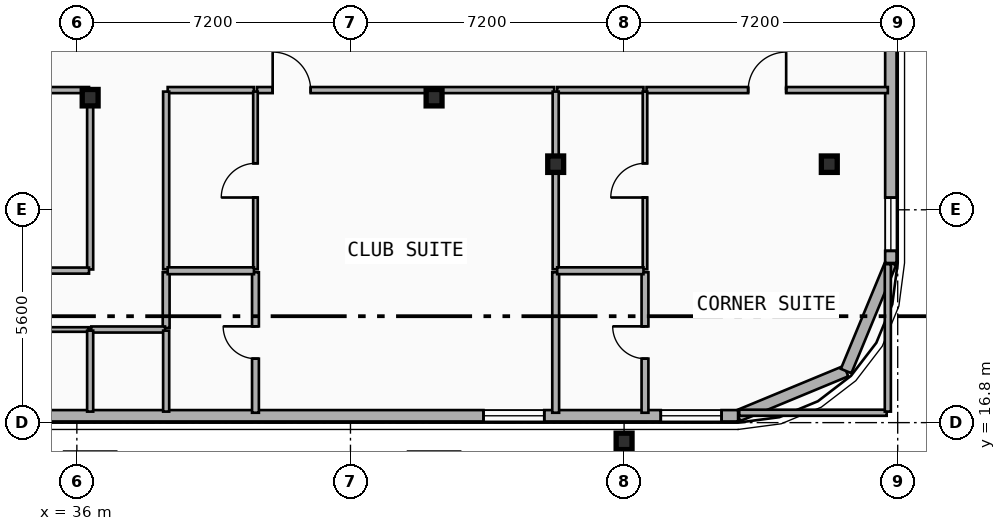
"""IFC4 building model, lengths in metres.
Left out: names, types, materials, properties, quantities, classifications, styles, units other than length and angle.
Written with IfcOpenShell. Run it as: python <this file> out.ifc"""

import sys

from ifc_helpers import new_model, si_unit, direction, frame, frame_2d, origin, origin_2d, place, context, subcontext, project, spatial, rectangle, i_section, extrude, element, fill, save


model = new_model("IFC4")
c1 = context("Model", 3, precision=1e-05, world=origin(), true_north=direction((0.0, 1.0)))
c2 = subcontext(c1, "Body", "Model", "MODEL_VIEW")
j1 = project(units=[si_unit("LENGTHUNIT", "METRE"), si_unit("PLANEANGLEUNIT", "RADIAN")], contexts=[c1])
p1 = place(None, origin())
s1 = spatial("IfcSite", under=j1, at=p1, CompositionType="ELEMENT")
p2 = place(p1, origin())
s2 = spatial("IfcBuilding", under=s1, at=p2, CompositionType="ELEMENT")
p3 = place(p2, frame((0.0, 0.0, 118.8)))
s3 = spatial("IfcBuildingStorey", under=s2, at=p3, CompositionType="ELEMENT", Elevation=118.8)
for number, where, z_axis, x_axis in (
    (1, (36.35, 25.35, 0.0), (0.0, 0.0, 1.0), (1.0, 0.0, 0.0)),
    (2, (45.4, 25.35, 0.0), (0.0, 0.0, 1.0), (1.0, 0.0, 0.0)),
):
    element("IfcColumn", number, at=place(p3, frame(where, z_axis=z_axis, x_axis=x_axis)), inside=s3, PredefinedType="COLUMN", context=c2, shape_type="SweptSolid", body=[
        extrude(i_section(OverallWidth=0.418, OverallDepth=0.432, WebThickness=0.035, FlangeThickness=0.056, FilletRadius=0.015, at=origin_2d()), origin(), (0.0, 0.0, 1.0), 3.5),
    ])
for number, where, z_axis, x_axis in (
    (3, (36.35, 15.462, 0.0), (0.0, -0.09, 0.996), (1.0, 0.0, 0.0)),
    (4, (45.4, 15.462, 0.0), (0.0, -0.09, 0.996), (1.0, 0.0, 0.0)),
):
    element("IfcColumn", number, at=place(p3, frame(where, z_axis=z_axis, x_axis=x_axis)), inside=s3, PredefinedType="COLUMN", context=c2, shape_type="SweptSolid", body=[
        extrude(rectangle(XDim=1.3, YDim=1.3, at=origin_2d()), origin(), (0.0, 0.0, 1.0), 3.514),
    ])
p4 = place(p3, frame((48.6, 23.6, 0.0), z_axis=(0.0, 0.0, 1.0), x_axis=(1.0, 0.0, 0.0)))
e5 = element("IfcColumn", 5, at=p4, inside=s3, PredefinedType="COLUMN", context=c2, shape_type="SweptSolid", body=[
    extrude(i_section(OverallWidth=0.418, OverallDepth=0.432, WebThickness=0.035, FlangeThickness=0.056, FilletRadius=0.015, at=origin_2d()), origin(), (0.0, 0.0, 1.0), 3.5),
])
p5 = place(p3, frame((50.4, 16.403, 0.0), z_axis=(0.0, -0.079891690793, 0.996803550226), x_axis=(1.0, 0.0, 0.0)))
e6 = element("IfcColumn", 6, at=p5, inside=s3, PredefinedType="COLUMN", context=c2, shape_type="SweptSolid", body=[
    extrude(i_section(OverallWidth=0.418, OverallDepth=0.432, WebThickness=0.035, FlangeThickness=0.056, FilletRadius=0.015, at=origin_2d()), origin(), (0.0, 0.0, 1.0), 3.511),
])
p6 = place(p3, frame((55.8, 23.6, 0.0), z_axis=(0.0, 0.0, 1.0), x_axis=(1.0, 0.0, 0.0)))
e7 = element("IfcColumn", 7, at=p6, inside=s3, PredefinedType="COLUMN", context=c2, shape_type="SweptSolid", body=[
    extrude(i_section(OverallWidth=0.418, OverallDepth=0.432, WebThickness=0.035, FlangeThickness=0.056, FilletRadius=0.015, at=origin_2d()), origin(), (0.0, 0.0, 1.0), 3.5),
])
p7 = place(p3, frame((56.243, 18.157, 0.0), z_axis=(0.0, 0.0, 1.0), x_axis=(-0.923882414032, -0.382676475685, 0.0)))
e8 = element("IfcWall", 8, at=p7, inside=s3, PredefinedType="SOLIDWALL", context=c2, shape_type="SweptSolid", body=[
    extrude(rectangle(XDim=3.077, YDim=0.3, at=frame_2d((1.539, 0.0))), origin(), (0.0, 0.0, 1.0), 3.24),
])
p8 = place(p3, frame((57.42, 21.0, 0.0), z_axis=(0.0, 0.0, 1.0), x_axis=(-0.382636798336, -0.92389884758, 0.0)))
e9 = element("IfcWall", 9, at=p8, inside=s3, PredefinedType="SOLIDWALL", context=c2, shape_type="SweptSolid", body=[
    extrude(rectangle(XDim=3.077, YDim=0.3, at=frame_2d((1.538, 0.0))), origin(), (0.0, 0.0, 1.0), 3.24),
])
p9 = place(p3, frame((57.42, 39.0, 0.0), z_axis=(0.0, 0.0, 1.0), x_axis=(0.0, -1.0, 0.0)))
e10 = element("IfcWall", 10, at=p9, inside=s3, PredefinedType="SOLIDWALL", context=c2, shape_type="SweptSolid", body=[
    extrude(rectangle(XDim=18.0, YDim=0.3, at=frame_2d((9.0, 0.0))), origin(), (0.0, 0.0, 1.0), 3.24),
])
p10 = place(p9, frame((8.882, 0.0, 0.48)))
e11 = element("IfcOpeningElement", 11, at=p10, cuts=e10, PredefinedType="OPENING", context=c2, shape_type="SweptSolid", body=[
    extrude(rectangle(XDim=1.4, YDim=1.8, at=frame_2d((0.7, 0.9))), frame((0.0, 0.16, 0.0), z_axis=(0.0, -1.0, 0.0), x_axis=(1.0, 0.0, 0.0)), (0.0, 0.0, 1.0), 0.32),
])
p11 = place(p9, frame((3.621, 0.0, 0.48)))
e12 = element("IfcOpeningElement", 12, at=p11, cuts=e10, PredefinedType="OPENING", context=c2, shape_type="SweptSolid", body=[
    extrude(rectangle(XDim=1.4, YDim=1.8, at=frame_2d((0.7, 0.9))), frame((0.0, 0.16, 0.0), z_axis=(0.0, -1.0, 0.0), x_axis=(1.0, 0.0, 0.0)), (0.0, 0.0, 1.0), 0.32),
])
p12 = place(p9, frame((16.28, 0.0, 0.65)))
e13 = element("IfcOpeningElement", 13, at=p12, cuts=e10, PredefinedType="OPENING", context=c2, shape_type="SweptSolid", body=[
    extrude(rectangle(XDim=1.4, YDim=1.8, at=frame_2d((0.7, 0.9))), frame((0.0, 0.16, 0.0), z_axis=(0.0, -1.0, 0.0), x_axis=(1.0, 0.0, 0.0)), (0.0, 0.0, 1.0), 0.32),
])
p13 = place(p3, frame((53.4, 16.98, 0.0), z_axis=(0.0, 0.0, 1.0), x_axis=(-1.0, 0.0, 0.0)))
e14 = element("IfcWall", 14, at=p13, inside=s3, PredefinedType="SOLIDWALL", context=c2, shape_type="SweptSolid", body=[
    extrude(rectangle(XDim=49.2, YDim=0.3, at=frame_2d((24.6, 0.0))), origin(), (0.0, 0.0, 1.0), 3.24),
])
p14 = place(p13, frame((41.962, 0.0, 0.65)))
e15 = element("IfcOpeningElement", 15, at=p14, cuts=e14, PredefinedType="OPENING", context=c2, shape_type="SweptSolid", body=[
    extrude(rectangle(XDim=1.6, YDim=1.95, at=frame_2d((0.8, 0.975))), frame((0.0, 0.16, 0.0), z_axis=(0.0, -1.0, 0.0), x_axis=(1.0, 0.0, 0.0)), (0.0, 0.0, 1.0), 0.32),
])
p15 = place(p13, frame((28.7, 0.0, 0.65)))
e16 = element("IfcOpeningElement", 16, at=p15, cuts=e14, PredefinedType="OPENING", context=c2, shape_type="SweptSolid", body=[
    extrude(rectangle(XDim=1.6, YDim=1.95, at=frame_2d((0.8, 0.975))), frame((0.0, 0.16, 0.0), z_axis=(0.0, -1.0, 0.0), x_axis=(1.0, 0.0, 0.0)), (0.0, 0.0, 1.0), 0.32),
])
p16 = place(p13, frame((5.1, 0.0, 0.65)))
e17 = element("IfcOpeningElement", 17, at=p16, cuts=e14, PredefinedType="OPENING", context=c2, shape_type="SweptSolid", body=[
    extrude(rectangle(XDim=1.6, YDim=1.95, at=frame_2d((0.8, 0.975))), frame((0.0, 0.16, 0.0), z_axis=(0.0, -1.0, 0.0), x_axis=(1.0, 0.0, 0.0)), (0.0, 0.0, 1.0), 0.32),
])
p17 = place(p13, frame((0.435, 0.0, 0.48)))
e18 = element("IfcOpeningElement", 18, at=p17, cuts=e14, PredefinedType="OPENING", context=c2, shape_type="SweptSolid", body=[
    extrude(rectangle(XDim=1.6, YDim=1.95, at=frame_2d((0.8, 0.975))), frame((0.0, 0.16, 0.0), z_axis=(0.0, -1.0, 0.0), x_axis=(1.0, 0.0, 0.0)), (0.0, 0.0, 1.0), 0.32),
])
p18 = place(p3, frame((40.74, 25.55, 0.0), z_axis=(0.0, 0.0, 1.0), x_axis=(1.0, 0.0, 0.0)))
e19 = element("IfcWall", 19, at=p18, inside=s3, PredefinedType="PARTITIONING", context=c2, shape_type="SweptSolid", body=[
    extrude(rectangle(XDim=7.82, YDim=0.16, at=frame_2d((3.91, 0.0))), origin(), (0.0, 0.0, 1.0), 2.406),
])
p19 = place(p18, frame((0.413, 0.0, 0.0)))
e20 = element("IfcOpeningElement", 20, at=p19, cuts=e19, PredefinedType="OPENING", context=c2, shape_type="SweptSolid", body=[
    extrude(rectangle(XDim=1.0, YDim=2.15, at=frame_2d((0.5, 1.075))), frame((0.0, 0.09, 0.0), z_axis=(0.0, -1.0, 0.0), x_axis=(1.0, 0.0, 0.0)), (0.0, 0.0, 1.0), 0.18),
])
p20 = place(p3, frame((38.39, 25.55, 0.0), z_axis=(0.0, 0.0, 1.0), x_axis=(1.0, 0.0, 0.0)))
e21 = element("IfcWall", 21, at=p20, inside=s3, PredefinedType="PARTITIONING", context=c2, shape_type="SweptSolid", body=[
    extrude(rectangle(XDim=2.27, YDim=0.16, at=frame_2d((1.135, 0.0))), origin(), (0.0, 0.0, 1.0), 3.24),
])
p21 = place(p3, frame((50.99, 25.55, 0.0), z_axis=(0.0, 0.0, 1.0), x_axis=(1.0, 0.0, 0.0)))
e22 = element("IfcWall", 22, at=p21, inside=s3, PredefinedType="PARTITIONING", context=c2, shape_type="SweptSolid", body=[
    extrude(rectangle(XDim=6.35, YDim=0.16, at=frame_2d((3.175, 0.0))), origin(), (0.0, 0.0, 1.0), 2.57),
])
p22 = place(p21, frame((2.675, 0.0, 0.0)))
e23 = element("IfcOpeningElement", 23, at=p22, cuts=e22, PredefinedType="OPENING", context=c2, shape_type="SweptSolid", body=[
    extrude(rectangle(XDim=1.0, YDim=2.15, at=frame_2d((0.5, 1.075))), frame((0.0, 0.09, 0.0), z_axis=(0.0, -1.0, 0.0), x_axis=(1.0, 0.0, 0.0)), (0.0, 0.0, 1.0), 0.18),
])
p23 = place(p3, frame((48.64, 25.55, 0.0), z_axis=(0.0, 0.0, 1.0), x_axis=(1.0, 0.0, 0.0)))
e24 = element("IfcWall", 24, at=p23, inside=s3, PredefinedType="PARTITIONING", context=c2, shape_type="SweptSolid", body=[
    extrude(rectangle(XDim=2.27, YDim=0.16, at=frame_2d((1.135, 0.0))), origin(), (0.0, 0.0, 1.0), 2.57),
])
p24 = place(p3, frame((38.35, 19.29, 0.0), z_axis=(0.0, 0.0, 1.0), x_axis=(0.0, 1.0, 0.0)))
e25 = element("IfcWall", 25, at=p24, inside=s3, PredefinedType="PLUMBINGWALL", context=c2, shape_type="SweptSolid", body=[
    extrude(rectangle(XDim=1.466, YDim=0.18, at=frame_2d((0.733, 0.0))), origin(), (0.0, 0.0, 1.0), 2.67),
])
p25 = place(p3, frame((38.35, 20.836, 0.0), z_axis=(0.0, 0.0, 1.0), x_axis=(0.0, 1.0, 0.0)))
e26 = element("IfcWall", 26, at=p25, inside=s3, PredefinedType="PARTITIONING", context=c2, shape_type="SweptSolid", body=[
    extrude(rectangle(XDim=4.674, YDim=0.16, at=frame_2d((2.337, 0.0))), origin(), (0.0, 0.0, 1.0), 2.82),
])
p26 = place(p3, frame((22.84, 19.25, 0.0), z_axis=(0.0, 0.0, 1.0), x_axis=(1.0, 0.0, 0.0)))
e27 = element("IfcWall", 27, at=p26, inside=s3, PredefinedType="PARTITIONING", context=c2, shape_type="SweptSolid", body=[
    extrude(rectangle(XDim=13.47, YDim=0.12, at=frame_2d((6.735, 0.0))), origin(), (0.0, 0.0, 1.0), 2.406),
])
p27 = place(p26, frame((6.285, 0.0, 0.0)))
e28 = element("IfcOpeningElement", 28, at=p27, cuts=e27, PredefinedType="OPENING", context=c2, shape_type="SweptSolid", body=[
    extrude(rectangle(XDim=0.9, YDim=2.1, at=frame_2d((0.45, 1.05))), frame((0.0, 0.07, 0.0), z_axis=(0.0, -1.0, 0.0), x_axis=(1.0, 0.0, 0.0)), (0.0, 0.0, 1.0), 0.14),
])
p28 = place(p3, frame((40.7, 17.06, 0.0), z_axis=(0.0, 0.0, 1.0), x_axis=(0.0, 1.0, 0.0)))
e29 = element("IfcWall", 29, at=p28, inside=s3, PredefinedType="PLUMBINGWALL", context=c2, shape_type="SweptSolid", body=[
    extrude(rectangle(XDim=3.696, YDim=0.18, at=frame_2d((1.848, 0.0))), origin(), (0.0, 0.0, 1.0), 2.67),
])
p29 = place(p28, frame((1.423, 0.0, 0.0)))
e30 = element("IfcOpeningElement", 30, at=p29, cuts=e29, PredefinedType="OPENING", context=c2, shape_type="SweptSolid", body=[
    extrude(rectangle(XDim=0.85, YDim=2.1, at=frame_2d((0.425, 1.05))), frame((0.0, 0.1, 0.0), z_axis=(0.0, -1.0, 0.0), x_axis=(1.0, 0.0, 0.0)), (0.0, 0.0, 1.0), 0.2),
])
p30 = place(p3, frame((40.7, 20.836, 0.0), z_axis=(0.0, 0.0, 1.0), x_axis=(0.0, 1.0, 0.0)))
e31 = element("IfcWall", 31, at=p30, inside=s3, PredefinedType="PARTITIONING", context=c2, shape_type="SweptSolid", body=[
    extrude(rectangle(XDim=4.674, YDim=0.12, at=frame_2d((2.337, 0.0))), origin(), (0.0, 0.0, 1.0), 2.82),
])
p31 = place(p30, frame((1.887, 0.0, 0.0)))
e32 = element("IfcOpeningElement", 32, at=p31, cuts=e31, PredefinedType="OPENING", context=c2, shape_type="SweptSolid", body=[
    extrude(rectangle(XDim=0.9, YDim=2.1, at=frame_2d((0.45, 1.05))), frame((0.0, 0.07, 0.0), z_axis=(0.0, -1.0, 0.0), x_axis=(1.0, 0.0, 0.0)), (0.0, 0.0, 1.0), 0.14),
])
p32 = place(p3, frame((48.6, 17.06, 0.0), z_axis=(0.0, 0.0, 1.0), x_axis=(0.0, 1.0, 0.0)))
e33 = element("IfcWall", 33, at=p32, inside=s3, PredefinedType="PLUMBINGWALL", context=c2, shape_type="SweptSolid", body=[
    extrude(rectangle(XDim=3.696, YDim=0.18, at=frame_2d((1.848, 0.0))), origin(), (0.0, 0.0, 1.0), 2.72),
])
p33 = place(p3, frame((48.6, 20.836, 0.0), z_axis=(0.0, 0.0, 1.0), x_axis=(0.0, 1.0, 0.0)))
e34 = element("IfcWall", 34, at=p33, inside=s3, PredefinedType="PARTITIONING", context=c2, shape_type="SweptSolid", body=[
    extrude(rectangle(XDim=4.674, YDim=0.16, at=frame_2d((2.337, 0.0))), origin(), (0.0, 0.0, 1.0), 2.72),
])
p34 = place(p3, frame((38.39, 20.796, 0.0), z_axis=(0.0, 0.0, 1.0), x_axis=(1.0, 0.0, 0.0)))
e35 = element("IfcWall", 35, at=p34, inside=s3, PredefinedType="PLUMBINGWALL", context=c2, shape_type="SweptSolid", body=[
    extrude(rectangle(XDim=2.27, YDim=0.18, at=frame_2d((1.135, 0.0))), origin(), (0.0, 0.0, 1.0), 3.24),
])
p35 = place(p3, frame((50.95, 17.06, 0.0), z_axis=(0.0, 0.0, 1.0), x_axis=(0.0, 1.0, 0.0)))
e36 = element("IfcWall", 36, at=p35, inside=s3, PredefinedType="PLUMBINGWALL", context=c2, shape_type="SweptSolid", body=[
    extrude(rectangle(XDim=3.696, YDim=0.18, at=frame_2d((1.848, 0.0))), origin(), (0.0, 0.0, 1.0), 2.57),
])
p36 = place(p35, frame((1.423, 0.0, 0.0)))
e37 = element("IfcOpeningElement", 37, at=p36, cuts=e36, PredefinedType="OPENING", context=c2, shape_type="SweptSolid", body=[
    extrude(rectangle(XDim=0.85, YDim=2.1, at=frame_2d((0.425, 1.05))), frame((0.0, 0.1, 0.0), z_axis=(0.0, -1.0, 0.0), x_axis=(1.0, 0.0, 0.0)), (0.0, 0.0, 1.0), 0.2),
])
p37 = place(p3, frame((50.95, 20.836, 0.0), z_axis=(0.0, 0.0, 1.0), x_axis=(0.0, 1.0, 0.0)))
e38 = element("IfcWall", 38, at=p37, inside=s3, PredefinedType="PARTITIONING", context=c2, shape_type="SweptSolid", body=[
    extrude(rectangle(XDim=4.674, YDim=0.12, at=frame_2d((2.337, 0.0))), origin(), (0.0, 0.0, 1.0), 2.57),
])
p38 = place(p37, frame((1.887, 0.0, 0.0)))
e39 = element("IfcOpeningElement", 39, at=p38, cuts=e38, PredefinedType="OPENING", context=c2, shape_type="SweptSolid", body=[
    extrude(rectangle(XDim=0.9, YDim=2.1, at=frame_2d((0.45, 1.05))), frame((0.0, 0.07, 0.0), z_axis=(0.0, -1.0, 0.0), x_axis=(1.0, 0.0, 0.0)), (0.0, 0.0, 1.0), 0.14),
])
p39 = place(p3, frame((48.64, 20.796, 0.0), z_axis=(0.0, 0.0, 1.0), x_axis=(1.0, 0.0, 0.0)))
e40 = element("IfcWall", 40, at=p39, inside=s3, PredefinedType="PLUMBINGWALL", context=c2, shape_type="SweptSolid", body=[
    extrude(rectangle(XDim=2.27, YDim=0.18, at=frame_2d((1.135, 0.0))), origin(), (0.0, 0.0, 1.0), 2.57),
])
p40 = place(p3, frame((22.83, 25.55, 0.0), z_axis=(0.0, 0.0, 1.0), x_axis=(1.0, 0.0, 0.0)))
e41 = element("IfcWall", 41, at=p40, inside=s3, PredefinedType="PARTITIONING", context=c2, shape_type="SweptSolid", body=[
    extrude(rectangle(XDim=13.49, YDim=0.16, at=frame_2d((6.745, 0.0))), origin(), (0.0, 0.0, 1.0), 2.406),
])
p41 = place(p3, frame((36.38, 19.25, 0.0), z_axis=(0.0, 0.0, 1.0), x_axis=(1.0, 0.0, 0.0)))
e42 = element("IfcWall", 42, at=p41, inside=s3, PredefinedType="PARTITIONING", context=c2, shape_type="SweptSolid", body=[
    extrude(rectangle(XDim=1.94, YDim=0.16, at=frame_2d((0.97, 0.0))), origin(), (0.0, 0.0, 1.0), 2.406),
])
p42 = place(p3, frame((36.35, 20.83, 0.0), z_axis=(0.0, 0.0, 1.0), x_axis=(0.0, 1.0, 0.0)))
e43 = element("IfcWall", 43, at=p42, inside=s3, PredefinedType="PARTITIONING", context=c2, shape_type="SweptSolid", body=[
    extrude(rectangle(XDim=4.69, YDim=0.16, at=frame_2d((2.345, 0.0))), origin(), (0.0, 0.0, 1.0), 2.406),
])
p43 = place(p3, frame((34.48, 20.8, 0.0), z_axis=(0.0, 0.0, 1.0), x_axis=(1.0, 0.0, 0.0)))
e44 = element("IfcWall", 44, at=p43, inside=s3, PredefinedType="PARTITIONING", context=c2, shape_type="SweptSolid", body=[
    extrude(rectangle(XDim=1.84, YDim=0.16, at=frame_2d((0.92, 0.0))), origin(), (0.0, 0.0, 1.0), 2.406),
])
p44 = place(p3, frame((36.35, 17.09, 0.0), z_axis=(0.0, 0.0, 1.0), x_axis=(0.0, 1.0, 0.0)))
e45 = element("IfcWall", 45, at=p44, inside=s3, PredefinedType="PARTITIONING", context=c2, shape_type="SweptSolid", body=[
    extrude(rectangle(XDim=2.13, YDim=0.16, at=frame_2d((1.065, 0.0))), origin(), (0.0, 0.0, 1.0), 2.406),
])
p45 = place(p3, frame((38.35, 17.09, 0.0), z_axis=(0.0, 0.0, 1.0), x_axis=(0.0, 1.0, 0.0)))
e46 = element("IfcWall", 46, at=p45, inside=s3, PredefinedType="PARTITIONING", context=c2, shape_type="SweptSolid", body=[
    extrude(rectangle(XDim=2.13, YDim=0.16, at=frame_2d((1.065, 0.0))), origin(), (0.0, 0.0, 1.0), 2.67),
])
p46 = place(p3, frame((53.43, 17.06, 0.0), z_axis=(0.0, 0.0, 1.0), x_axis=(1.0, 0.0, 0.0)))
e47 = element("IfcWall", 47, at=p46, inside=s3, PredefinedType="PARTITIONING", context=c2, shape_type="SweptSolid", body=[
    extrude(rectangle(XDim=3.88, YDim=0.16, at=frame_2d((1.94, 0.0))), origin(), (0.0, 0.0, 1.0), 2.72),
])
p47 = place(p3, frame((57.34, 17.09, 0.0), z_axis=(0.0, 0.0, 1.0), x_axis=(0.0, 1.0, 0.0)))
e48 = element("IfcWall", 48, at=p47, inside=s3, PredefinedType="PARTITIONING", context=c2, shape_type="SweptSolid", body=[
    extrude(rectangle(XDim=3.88, YDim=0.16, at=frame_2d((1.94, 0.0))), origin(), (0.0, 0.0, 1.0), 3.24),
])
p48 = place(p12, origin())
e49 = element("IfcWindow", 49, at=p48, inside=s3, PartitioningType="SINGLE_PANEL", PredefinedType="WINDOW", context=c2, shape_type="SweptSolid", body=[
    extrude(rectangle(XDim=1.4, YDim=1.8, at=frame_2d((0.7, 0.9))), frame((0.0, 0.03, 0.0), z_axis=(0.0, -1.0, 0.0), x_axis=(1.0, 0.0, 0.0)), (0.0, 0.0, 1.0), 0.06),
])
fill(e13, e49)
p49 = place(p16, origin())
e50 = element("IfcWindow", 50, at=p49, inside=s3, PartitioningType="SINGLE_PANEL", PredefinedType="WINDOW", context=c2, shape_type="SweptSolid", body=[
    extrude(rectangle(XDim=1.6, YDim=1.95, at=frame_2d((0.8, 0.975))), frame((0.0, 0.03, 0.0), z_axis=(0.0, -1.0, 0.0), x_axis=(1.0, 0.0, 0.0)), (0.0, 0.0, 1.0), 0.06),
])
fill(e17, e50)
p50 = place(p17, origin())
e51 = element("IfcWindow", 51, at=p50, inside=s3, PartitioningType="SINGLE_PANEL", PredefinedType="WINDOW", context=c2, shape_type="SweptSolid", body=[
    extrude(rectangle(XDim=1.6, YDim=1.95, at=frame_2d((0.8, 0.975))), frame((0.0, 0.03, 0.0), z_axis=(0.0, -1.0, 0.0), x_axis=(1.0, 0.0, 0.0)), (0.0, 0.0, 1.0), 0.06),
])
fill(e18, e51)
p51 = place(p19, origin())
e52 = element("IfcDoor", 52, at=p51, inside=s3, OperationType="SINGLE_SWING_LEFT", PredefinedType="DOOR", context=c2, shape_type="SweptSolid", body=[
    extrude(rectangle(XDim=1.0, YDim=2.15, at=frame_2d((0.5, 1.075))), frame((0.0, 0.025, 0.0), z_axis=(0.0, -1.0, 0.0), x_axis=(1.0, 0.0, 0.0)), (0.0, 0.0, 1.0), 0.05),
])
fill(e20, e52)
p52 = place(p22, origin())
e53 = element("IfcDoor", 53, at=p52, inside=s3, OperationType="SINGLE_SWING_RIGHT", PredefinedType="DOOR", context=c2, shape_type="SweptSolid", body=[
    extrude(rectangle(XDim=1.0, YDim=2.15, at=frame_2d((0.5, 1.075))), frame((0.0, 0.025, 0.0), z_axis=(0.0, -1.0, 0.0), x_axis=(1.0, 0.0, 0.0)), (0.0, 0.0, 1.0), 0.05),
])
fill(e23, e53)
p53 = place(p29, origin())
e54 = element("IfcDoor", 54, at=p53, inside=s3, OperationType="SINGLE_SWING_RIGHT", PredefinedType="DOOR", context=c2, shape_type="SweptSolid", body=[
    extrude(rectangle(XDim=0.85, YDim=2.1, at=frame_2d((0.425, 1.05))), frame((0.0, 0.025, 0.0), z_axis=(0.0, -1.0, 0.0), x_axis=(1.0, 0.0, 0.0)), (0.0, 0.0, 1.0), 0.05),
])
fill(e30, e54)
p54 = place(p31, origin())
e55 = element("IfcDoor", 55, at=p54, inside=s3, OperationType="SINGLE_SWING_LEFT", PredefinedType="DOOR", context=c2, shape_type="SweptSolid", body=[
    extrude(rectangle(XDim=0.9, YDim=2.1, at=frame_2d((0.45, 1.05))), frame((0.0, 0.025, 0.0), z_axis=(0.0, -1.0, 0.0), x_axis=(1.0, 0.0, 0.0)), (0.0, 0.0, 1.0), 0.05),
])
fill(e32, e55)
p55 = place(p36, origin())
e56 = element("IfcDoor", 56, at=p55, inside=s3, OperationType="SINGLE_SWING_RIGHT", PredefinedType="DOOR", context=c2, shape_type="SweptSolid", body=[
    extrude(rectangle(XDim=0.85, YDim=2.1, at=frame_2d((0.425, 1.05))), frame((0.0, 0.025, 0.0), z_axis=(0.0, -1.0, 0.0), x_axis=(1.0, 0.0, 0.0)), (0.0, 0.0, 1.0), 0.05),
])
fill(e37, e56)
p56 = place(p38, origin())
e57 = element("IfcDoor", 57, at=p56, inside=s3, OperationType="SINGLE_SWING_LEFT", PredefinedType="DOOR", context=c2, shape_type="SweptSolid", body=[
    extrude(rectangle(XDim=0.9, YDim=2.1, at=frame_2d((0.45, 1.05))), frame((0.0, 0.025, 0.0), z_axis=(0.0, -1.0, 0.0), x_axis=(1.0, 0.0, 0.0)), (0.0, 0.0, 1.0), 0.05),
])
fill(e39, e57)
save(model, sys.argv[1])
